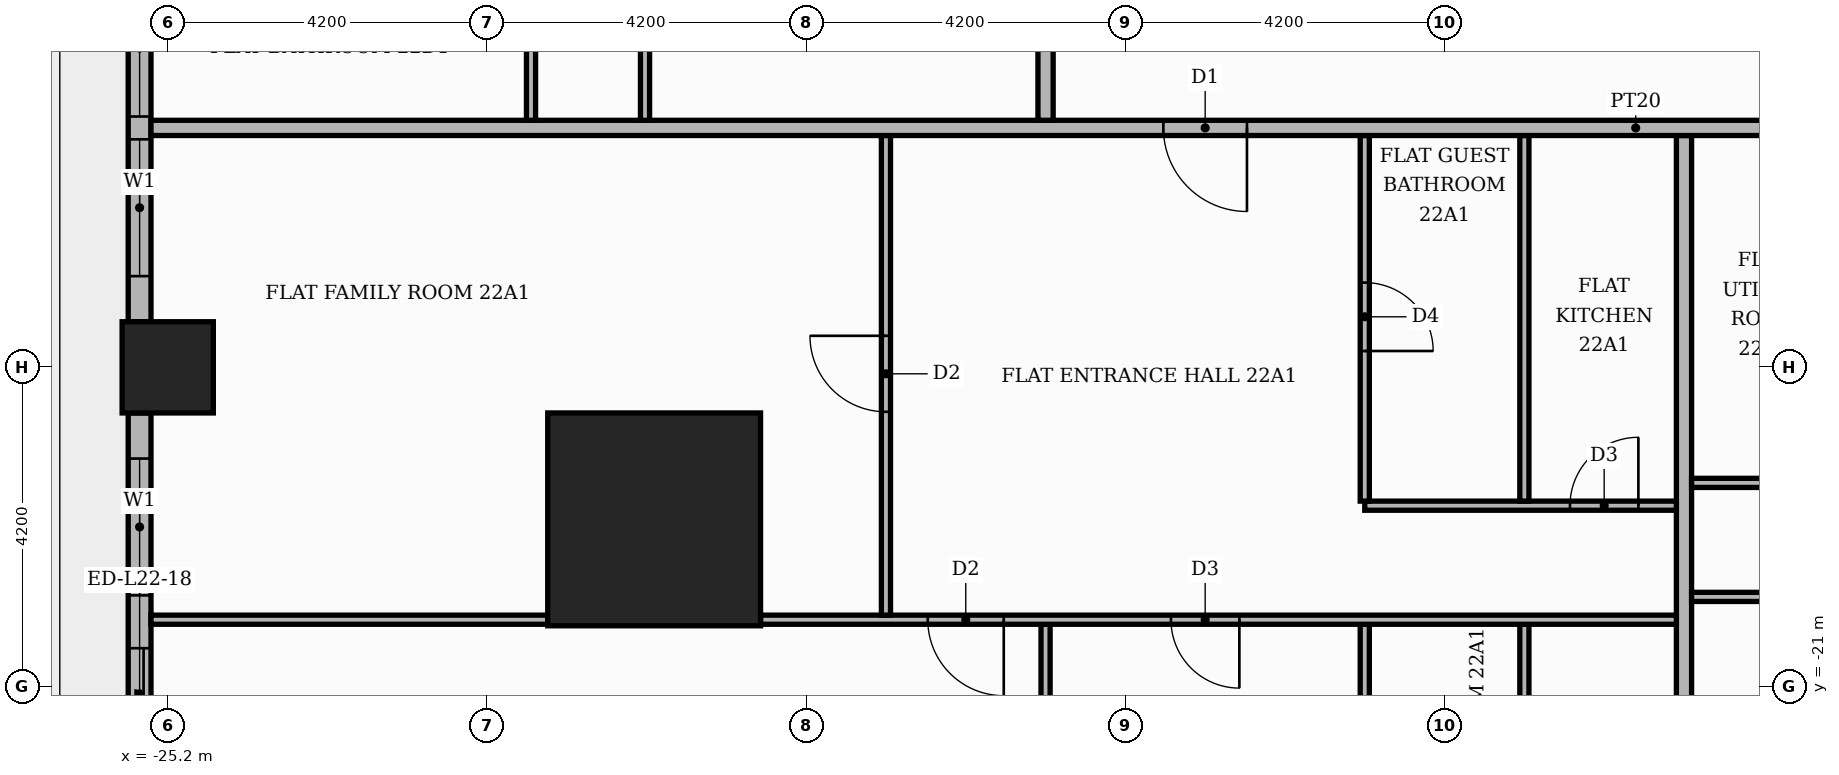
"""IFC4 building model, lengths in metres.
Left out: names, types, materials, properties, quantities, classifications, styles, units other than length and angle.
Written with IfcOpenShell. Run it as: python <this file> out.ifc"""

import sys

from ifc_helpers import new_model, si_unit, direction, frame, frame_2d, origin, origin_2d, place, context, subcontext, project, spatial, rectangle, extrude, element, fill, save


model = new_model("IFC4")
c1 = context("Model", 3, precision=1e-05, world=origin(), true_north=direction((0.0, 1.0)))
c2 = subcontext(c1, "Body", "Model", "MODEL_VIEW")
j1 = project(units=[si_unit("LENGTHUNIT", "METRE"), si_unit("PLANEANGLEUNIT", "RADIAN")], contexts=[c1])
p1 = place(None, origin())
s1 = spatial("IfcSite", under=j1, at=p1, CompositionType="ELEMENT")
p2 = place(p1, origin())
s2 = spatial("IfcBuilding", under=s1, at=p2, CompositionType="ELEMENT")
p3 = place(p2, frame((0.0, 0.0, 94.8)))
s3 = spatial("IfcBuildingStorey", under=s2, at=p3, CompositionType="ELEMENT", Elevation=94.8)
p4 = place(p3, frame((-18.8, -18.8, 0.0), z_axis=(0.0, 0.0, 1.0), x_axis=(1.0, 0.0, 0.0)))
e1 = element("IfcColumn", 1, at=p4, inside=s3, PredefinedType="COLUMN", context=c2, shape_type="SweptSolid", body=[
    extrude(rectangle(XDim=2.8, YDim=2.8, at=origin_2d()), origin(), (0.0, 0.0, 1.0), 3.9),
])
p5 = place(p3, frame((-25.2, -16.8, 0.0), z_axis=(0.0, 0.0, 1.0), x_axis=(1.0, 0.0, 0.0)))
e2 = element("IfcColumn", 2, at=p5, inside=s3, PredefinedType="COLUMN", context=c2, shape_type="SweptSolid", body=[
    extrude(rectangle(XDim=1.2, YDim=1.2, at=origin_2d()), origin(), (0.0, 0.0, 1.0), 3.9),
])
p6 = place(p3, frame((-25.57, -9.0, 0.0), z_axis=(0.0, 0.0, 1.0), x_axis=(0.0, -1.0, 0.0)))
e3 = element("IfcWall", 3, at=p6, inside=s3, PredefinedType="STANDARD", context=c2, shape_type="SweptSolid", body=[
    extrude(rectangle(XDim=7.2, YDim=0.3, at=frame_2d((3.6, 0.0))), origin(), (0.0, 0.0, 1.0), 3.48),
])
p7 = place(p6, frame((0.6, 0.0, 0.9)))
e4 = element("IfcOpeningElement", 4, at=p7, cuts=e3, PredefinedType="OPENING", context=c2, shape_type="SweptSolid", body=[
    extrude(rectangle(XDim=1.8, YDim=2.1, at=frame_2d((0.9, 1.05))), frame((0.0, 0.16, 0.0), z_axis=(0.0, -1.0, 0.0), x_axis=(1.0, 0.0, 0.0)), (0.0, 0.0, 1.0), 0.32),
])
p8 = place(p6, frame((2.7, 0.0, 0.9)))
e5 = element("IfcOpeningElement", 5, at=p8, cuts=e3, PredefinedType="OPENING", context=c2, shape_type="SweptSolid", body=[
    extrude(rectangle(XDim=1.8, YDim=2.1, at=frame_2d((0.9, 1.05))), frame((0.0, 0.16, 0.0), z_axis=(0.0, -1.0, 0.0), x_axis=(1.0, 0.0, 0.0)), (0.0, 0.0, 1.0), 0.32),
])
p9 = place(p6, frame((4.8, 0.0, 0.9)))
e6 = element("IfcOpeningElement", 6, at=p9, cuts=e3, PredefinedType="OPENING", context=c2, shape_type="SweptSolid", body=[
    extrude(rectangle(XDim=1.8, YDim=2.1, at=frame_2d((0.9, 1.05))), frame((0.0, 0.16, 0.0), z_axis=(0.0, -1.0, 0.0), x_axis=(1.0, 0.0, 0.0)), (0.0, 0.0, 1.0), 0.32),
])
p10 = place(p3, frame((-25.57, -17.4, 0.0), z_axis=(0.0, 0.0, 1.0), x_axis=(0.0, -1.0, 0.0)))
e7 = element("IfcWall", 7, at=p10, inside=s3, PredefinedType="STANDARD", context=c2, shape_type="SweptSolid", body=[
    extrude(rectangle(XDim=4.82, YDim=0.3, at=frame_2d((2.41, 0.0))), origin(), (0.0, 0.0, 1.0), 3.48),
])
p11 = place(p10, frame((0.6, 0.0, 0.9)))
e8 = element("IfcOpeningElement", 8, at=p11, cuts=e7, PredefinedType="OPENING", context=c2, shape_type="SweptSolid", body=[
    extrude(rectangle(XDim=1.8, YDim=2.1, at=frame_2d((0.9, 1.05))), frame((0.0, 0.16, 0.0), z_axis=(0.0, -1.0, 0.0), x_axis=(1.0, 0.0, 0.0)), (0.0, 0.0, 1.0), 0.32),
])
p12 = place(p10, frame((3.095, 0.0, 0.0)))
e9 = element("IfcOpeningElement", 9, at=p12, cuts=e7, PredefinedType="OPENING", context=c2, shape_type="SweptSolid", body=[
    extrude(rectangle(XDim=1.2, YDim=2.4, at=frame_2d((0.6, 1.2))), frame((0.0, 0.16, 0.0), z_axis=(0.0, -1.0, 0.0), x_axis=(1.0, 0.0, 0.0)), (0.0, 0.0, 1.0), 0.32),
])
p13 = place(p3, frame((-13.65, -25.42, 0.0), z_axis=(0.0, 0.0, 1.0), x_axis=(0.0, 1.0, 0.0)))
e10 = element("IfcWall", 10, at=p13, inside=s3, PredefinedType="PARTITIONING", context=c2, shape_type="SweptSolid", body=[
    extrude(rectangle(XDim=5.24, YDim=0.12, at=frame_2d((2.62, 0.0))), origin(), (0.0, 0.0, 1.0), 3.48),
])
p14 = place(p3, frame((-9.45, -25.42, 0.0), z_axis=(0.0, 0.0, 1.0), x_axis=(0.0, 1.0, 0.0)))
e11 = element("IfcWall", 11, at=p14, inside=s3, PredefinedType="PARTITIONING", context=c2, shape_type="SweptSolid", body=[
    extrude(rectangle(XDim=5.24, YDim=0.12, at=frame_2d((2.62, 0.0))), origin(), (0.0, 0.0, 1.0), 3.48),
])
p15 = place(p14, frame((2.05, 0.0, 0.0)))
e12 = element("IfcOpeningElement", 12, at=p15, cuts=e11, PredefinedType="OPENING", context=c2, shape_type="SweptSolid", body=[
    extrude(rectangle(XDim=0.9, YDim=2.1, at=frame_2d((0.45, 1.05))), frame((0.0, 0.07, 0.0), z_axis=(0.0, -1.0, 0.0), x_axis=(1.0, 0.0, 0.0)), (0.0, 0.0, 1.0), 0.14),
])
p16 = place(p3, frame((-7.35, -25.42, 0.0), z_axis=(0.0, 0.0, 1.0), x_axis=(0.0, 1.0, 0.0)))
e13 = element("IfcWall", 13, at=p16, inside=s3, PredefinedType="PARTITIONING", context=c2, shape_type="SweptSolid", body=[
    extrude(rectangle(XDim=5.24, YDim=0.12, at=frame_2d((2.62, 0.0))), origin(), (0.0, 0.0, 1.0), 3.48),
])
p17 = place(p16, frame((2.05, 0.0, 0.0)))
e14 = element("IfcOpeningElement", 14, at=p17, cuts=e13, PredefinedType="OPENING", context=c2, shape_type="SweptSolid", body=[
    extrude(rectangle(XDim=0.9, YDim=2.1, at=frame_2d((0.45, 1.05))), frame((0.0, 0.07, 0.0), z_axis=(0.0, -1.0, 0.0), x_axis=(1.0, 0.0, 0.0)), (0.0, 0.0, 1.0), 0.14),
])
p18 = place(p3, frame((-5.25, -25.42, 0.0), z_axis=(0.0, 0.0, 1.0), x_axis=(0.0, 1.0, 0.0)))
e15 = element("IfcWall", 15, at=p18, inside=s3, PredefinedType="PARTITIONING", context=c2, shape_type="SweptSolid", body=[
    extrude(rectangle(XDim=11.67, YDim=0.2, at=frame_2d((5.835, 0.0))), origin(), (0.0, 0.0, 1.0), 3.48),
])
p19 = place(p3, frame((-25.42, -20.12, 0.0), z_axis=(0.0, 0.0, 1.0), x_axis=(1.0, 0.0, 0.0)))
e16 = element("IfcWall", 16, at=p19, inside=s3, PredefinedType="PARTITIONING", context=c2, shape_type="SweptSolid", body=[
    extrude(rectangle(XDim=5.22, YDim=0.12, at=frame_2d((2.61, 0.0))), origin(), (0.0, 0.0, 1.0), 3.48),
])
p20 = place(p3, frame((-17.4, -20.12, 0.0), z_axis=(0.0, 0.0, 1.0), x_axis=(1.0, 0.0, 0.0)))
e17 = element("IfcWall", 17, at=p20, inside=s3, PredefinedType="PARTITIONING", context=c2, shape_type="SweptSolid", body=[
    extrude(rectangle(XDim=12.05, YDim=0.12, at=frame_2d((6.025, 0.0))), origin(), (0.0, 0.0, 1.0), 3.48),
])
p21 = place(p20, frame((2.2, 0.0, 0.0)))
e18 = element("IfcOpeningElement", 18, at=p21, cuts=e17, PredefinedType="OPENING", context=c2, shape_type="SweptSolid", body=[
    extrude(rectangle(XDim=1.0, YDim=2.1, at=frame_2d((0.5, 1.05))), frame((0.0, 0.07, 0.0), z_axis=(0.0, -1.0, 0.0), x_axis=(1.0, 0.0, 0.0)), (0.0, 0.0, 1.0), 0.14),
])
p22 = place(p20, frame((5.4, 0.0, 0.0)))
e19 = element("IfcOpeningElement", 19, at=p22, cuts=e17, PredefinedType="OPENING", context=c2, shape_type="SweptSolid", body=[
    extrude(rectangle(XDim=0.9, YDim=2.1, at=frame_2d((0.45, 1.05))), frame((0.0, 0.07, 0.0), z_axis=(0.0, -1.0, 0.0), x_axis=(1.0, 0.0, 0.0)), (0.0, 0.0, 1.0), 0.14),
])
p23 = place(p3, frame((-15.75, -20.06, 0.0), z_axis=(0.0, 0.0, 1.0), x_axis=(0.0, 1.0, 0.0)))
e20 = element("IfcWall", 20, at=p23, inside=s3, PredefinedType="PARTITIONING", context=c2, shape_type="SweptSolid", body=[
    extrude(rectangle(XDim=6.31, YDim=0.12, at=frame_2d((3.155, 0.0))), origin(), (0.0, 0.0, 1.0), 3.48),
])
p24 = place(p23, frame((2.675, 0.0, 0.0)))
e21 = element("IfcOpeningElement", 21, at=p24, cuts=e20, PredefinedType="OPENING", context=c2, shape_type="SweptSolid", body=[
    extrude(rectangle(XDim=1.0, YDim=2.1, at=frame_2d((0.5, 1.05))), frame((0.0, 0.07, 0.0), z_axis=(0.0, -1.0, 0.0), x_axis=(1.0, 0.0, 0.0)), (0.0, 0.0, 1.0), 0.14),
])
p25 = place(p3, frame((-5.15, -19.82, 0.0), z_axis=(0.0, 0.0, 1.0), x_axis=(1.0, 0.0, 0.0)))
e22 = element("IfcWall", 22, at=p25, inside=s3, PredefinedType="PARTITIONING", context=c2, shape_type="SweptSolid", body=[
    extrude(rectangle(XDim=18.7, YDim=0.12, at=frame_2d((9.35, 0.0))), origin(), (0.0, 0.0, 1.0), 3.48),
])
p26 = place(p25, frame((1.5, 0.0, 0.0)))
e23 = element("IfcOpeningElement", 23, at=p26, cuts=e22, PredefinedType="OPENING", context=c2, shape_type="SweptSolid", body=[
    extrude(rectangle(XDim=1.0, YDim=2.1, at=frame_2d((0.5, 1.05))), frame((0.0, 0.07, 0.0), z_axis=(0.0, -1.0, 0.0), x_axis=(1.0, 0.0, 0.0)), (0.0, 0.0, 1.0), 0.14),
])
p27 = place(p25, frame((5.75, 0.0, 0.0)))
e24 = element("IfcOpeningElement", 24, at=p27, cuts=e22, PredefinedType="OPENING", context=c2, shape_type="SweptSolid", body=[
    extrude(rectangle(XDim=0.9, YDim=2.1, at=frame_2d((0.45, 1.05))), frame((0.0, 0.07, 0.0), z_axis=(0.0, -1.0, 0.0), x_axis=(1.0, 0.0, 0.0)), (0.0, 0.0, 1.0), 0.14),
])
p28 = place(p25, frame((14.15, 0.0, 0.0)))
e25 = element("IfcOpeningElement", 25, at=p28, cuts=e22, PredefinedType="OPENING", context=c2, shape_type="SweptSolid", body=[
    extrude(rectangle(XDim=0.9, YDim=2.1, at=frame_2d((0.45, 1.05))), frame((0.0, 0.07, 0.0), z_axis=(0.0, -1.0, 0.0), x_axis=(1.0, 0.0, 0.0)), (0.0, 0.0, 1.0), 0.14),
])
p29 = place(p3, frame((-9.45, -18.62, 0.0), z_axis=(0.0, 0.0, 1.0), x_axis=(1.0, 0.0, 0.0)))
e26 = element("IfcWall", 26, at=p29, inside=s3, PredefinedType="PARTITIONING", context=c2, shape_type="SweptSolid", body=[
    extrude(rectangle(XDim=4.1, YDim=0.12, at=frame_2d((2.05, 0.0))), origin(), (0.0, 0.0, 1.0), 3.48),
])
p30 = place(p29, frame((2.7, 0.0, 0.0)))
e27 = element("IfcOpeningElement", 27, at=p30, cuts=e26, PredefinedType="OPENING", context=c2, shape_type="SweptSolid", body=[
    extrude(rectangle(XDim=0.9, YDim=2.1, at=frame_2d((0.45, 1.05))), frame((0.0, 0.07, 0.0), z_axis=(0.0, -1.0, 0.0), x_axis=(1.0, 0.0, 0.0)), (0.0, 0.0, 1.0), 0.14),
])
p31 = place(p3, frame((-9.45, -18.56, 0.0), z_axis=(0.0, 0.0, 1.0), x_axis=(0.0, 1.0, 0.0)))
e28 = element("IfcWall", 28, at=p31, inside=s3, PredefinedType="PARTITIONING", context=c2, shape_type="SweptSolid", body=[
    extrude(rectangle(XDim=4.81, YDim=0.12, at=frame_2d((2.405, 0.0))), origin(), (0.0, 0.0, 1.0), 3.48),
])
p32 = place(p31, frame((1.975, 0.0, 0.0)))
e29 = element("IfcOpeningElement", 29, at=p32, cuts=e28, PredefinedType="OPENING", context=c2, shape_type="SweptSolid", body=[
    extrude(rectangle(XDim=0.9, YDim=2.1, at=frame_2d((0.45, 1.05))), frame((0.0, 0.07, 0.0), z_axis=(0.0, -1.0, 0.0), x_axis=(1.0, 0.0, 0.0)), (0.0, 0.0, 1.0), 0.14),
])
p33 = place(p3, frame((-7.35, -18.56, 0.0), z_axis=(0.0, 0.0, 1.0), x_axis=(0.0, 1.0, 0.0)))
e30 = element("IfcWall", 30, at=p33, inside=s3, PredefinedType="PARTITIONING", context=c2, shape_type="SweptSolid", body=[
    extrude(rectangle(XDim=4.81, YDim=0.12, at=frame_2d((2.405, 0.0))), origin(), (0.0, 0.0, 1.0), 3.48),
])
p34 = place(p3, frame((-5.15, -18.32, 0.0), z_axis=(0.0, 0.0, 1.0), x_axis=(1.0, 0.0, 0.0)))
e31 = element("IfcWall", 31, at=p34, inside=s3, PredefinedType="PARTITIONING", context=c2, shape_type="SweptSolid", body=[
    extrude(rectangle(XDim=2.0, YDim=0.12, at=frame_2d((1.0, 0.0))), origin(), (0.0, 0.0, 1.0), 3.48),
])
p35 = place(p3, frame((-25.42, -13.65, 0.0), z_axis=(0.0, 0.0, 1.0), x_axis=(1.0, 0.0, 0.0)))
e32 = element("IfcWall", 32, at=p35, inside=s3, PredefinedType="PARTITIONING", context=c2, shape_type="SweptSolid", body=[
    extrude(rectangle(XDim=39.07, YDim=0.2, at=frame_2d((19.535, 0.0))), origin(), (0.0, 0.0, 1.0), 3.48),
])
p36 = place(p35, frame((13.32, 0.0, 0.0)))
e33 = element("IfcOpeningElement", 33, at=p36, cuts=e32, PredefinedType="OPENING", context=c2, shape_type="SweptSolid", body=[
    extrude(rectangle(XDim=1.1, YDim=2.4, at=frame_2d((0.55, 1.2))), frame((0.0, 0.11, 0.0), z_axis=(0.0, -1.0, 0.0), x_axis=(1.0, 0.0, 0.0)), (0.0, 0.0, 1.0), 0.22),
])
p37 = place(p35, frame((23.82, 0.0, 0.0)))
e34 = element("IfcOpeningElement", 34, at=p37, cuts=e32, PredefinedType="OPENING", context=c2, shape_type="SweptSolid", body=[
    extrude(rectangle(XDim=1.1, YDim=2.4, at=frame_2d((0.55, 1.2))), frame((0.0, 0.11, 0.0), z_axis=(0.0, -1.0, 0.0), x_axis=(1.0, 0.0, 0.0)), (0.0, 0.0, 1.0), 0.22),
])
p38 = place(p3, frame((-20.42, -13.55, 0.0), z_axis=(0.0, 0.0, 1.0), x_axis=(0.0, 1.0, 0.0)))
e35 = element("IfcWall", 35, at=p38, inside=s3, PredefinedType="PARTITIONING", context=c2, shape_type="SweptSolid", body=[
    extrude(rectangle(XDim=1.94, YDim=0.12, at=frame_2d((0.97, 0.0))), origin(), (0.0, 0.0, 1.0), 3.48),
])
p39 = place(p3, frame((-18.92, -13.55, 0.0), z_axis=(0.0, 0.0, 1.0), x_axis=(0.0, 1.0, 0.0)))
e36 = element("IfcWall", 36, at=p39, inside=s3, PredefinedType="PARTITIONING", context=c2, shape_type="SweptSolid", body=[
    extrude(rectangle(XDim=4.19, YDim=0.12, at=frame_2d((2.095, 0.0))), origin(), (0.0, 0.0, 1.0), 3.48),
])
p40 = place(p39, frame((1.625, 0.0, 0.0)))
e37 = element("IfcOpeningElement", 37, at=p40, cuts=e36, PredefinedType="OPENING", context=c2, shape_type="SweptSolid", body=[
    extrude(rectangle(XDim=0.9, YDim=2.1, at=frame_2d((0.45, 1.05))), frame((0.0, 0.07, 0.0), z_axis=(0.0, -1.0, 0.0), x_axis=(1.0, 0.0, 0.0)), (0.0, 0.0, 1.0), 0.14),
])
p41 = place(p3, frame((-13.65, -13.55, 0.0), z_axis=(0.0, 0.0, 1.0), x_axis=(0.0, 1.0, 0.0)))
e38 = element("IfcWall", 38, at=p41, inside=s3, PredefinedType="PARTITIONING", context=c2, shape_type="SweptSolid", body=[
    extrude(rectangle(XDim=27.1, YDim=0.2, at=frame_2d((13.55, 0.0))), origin(), (0.0, 0.0, 1.0), 3.48),
])
p42 = place(p41, frame((24.55, 0.0, 0.0)))
e39 = element("IfcOpeningElement", 39, at=p42, cuts=e38, PredefinedType="OPENING", context=c2, shape_type="SweptSolid", body=[
    extrude(rectangle(XDim=1.1, YDim=2.4, at=frame_2d((0.55, 1.2))), frame((0.0, 0.11, 0.0), z_axis=(0.0, -1.0, 0.0), x_axis=(1.0, 0.0, 0.0)), (0.0, 0.0, 1.0), 0.22),
])
p43 = place(p8, origin())
e40 = element("IfcWindow", 40, at=p43, inside=s3, PartitioningType="SINGLE_PANEL", PredefinedType="WINDOW", context=c2, shape_type="SweptSolid", body=[
    extrude(rectangle(XDim=1.8, YDim=2.1, at=frame_2d((0.9, 1.05))), frame((0.0, 0.03, 0.0), z_axis=(0.0, -1.0, 0.0), x_axis=(1.0, 0.0, 0.0)), (0.0, 0.0, 1.0), 0.06),
])
fill(e5, e40)
p44 = place(p9, origin())
e41 = element("IfcWindow", 41, at=p44, inside=s3, PartitioningType="SINGLE_PANEL", PredefinedType="WINDOW", context=c2, shape_type="SweptSolid", body=[
    extrude(rectangle(XDim=1.8, YDim=2.1, at=frame_2d((0.9, 1.05))), frame((0.0, 0.03, 0.0), z_axis=(0.0, -1.0, 0.0), x_axis=(1.0, 0.0, 0.0)), (0.0, 0.0, 1.0), 0.06),
])
fill(e6, e41)
p45 = place(p11, origin())
e42 = element("IfcWindow", 42, at=p45, inside=s3, PartitioningType="SINGLE_PANEL", PredefinedType="WINDOW", context=c2, shape_type="SweptSolid", body=[
    extrude(rectangle(XDim=1.8, YDim=2.1, at=frame_2d((0.9, 1.05))), frame((0.0, 0.03, 0.0), z_axis=(0.0, -1.0, 0.0), x_axis=(1.0, 0.0, 0.0)), (0.0, 0.0, 1.0), 0.06),
])
fill(e8, e42)
p46 = place(p12, origin())
e43 = element("IfcDoor", 43, at=p46, inside=s3, OperationType="SLIDING_TO_RIGHT", PredefinedType="DOOR", context=c2, shape_type="SweptSolid", body=[
    extrude(rectangle(XDim=1.2, YDim=2.4, at=frame_2d((0.6, 1.2))), frame((0.0, 0.025, 0.0), z_axis=(0.0, -1.0, 0.0), x_axis=(1.0, 0.0, 0.0)), (0.0, 0.0, 1.0), 0.05),
])
fill(e9, e43)
p47 = place(p36, frame((1.1, 0.0, 0.0), z_axis=(0.0, 0.0, 1.0), x_axis=(-1.0, 0.0, 0.0)))
e44 = element("IfcDoor", 44, at=p47, inside=s3, OperationType="SINGLE_SWING_RIGHT", PredefinedType="DOOR", context=c2, shape_type="SweptSolid", body=[
    extrude(rectangle(XDim=1.1, YDim=2.4, at=frame_2d((0.55, 1.2))), frame((0.0, 0.025, 0.0), z_axis=(0.0, -1.0, 0.0), x_axis=(1.0, 0.0, 0.0)), (0.0, 0.0, 1.0), 0.05),
])
fill(e33, e44)
p48 = place(p24, origin())
e45 = element("IfcDoor", 45, at=p48, inside=s3, OperationType="SINGLE_SWING_RIGHT", PredefinedType="DOOR", context=c2, shape_type="SweptSolid", body=[
    extrude(rectangle(XDim=1.0, YDim=2.1, at=frame_2d((0.5, 1.05))), frame((0.0, 0.025, 0.0), z_axis=(0.0, -1.0, 0.0), x_axis=(1.0, 0.0, 0.0)), (0.0, 0.0, 1.0), 0.05),
])
fill(e21, e45)
p49 = place(p32, frame((0.9, 0.0, 0.0), z_axis=(0.0, 0.0, 1.0), x_axis=(-1.0, 0.0, 0.0)))
e46 = element("IfcDoor", 46, at=p49, inside=s3, OperationType="SINGLE_SWING_LEFT", PredefinedType="DOOR", context=c2, shape_type="SweptSolid", body=[
    extrude(rectangle(XDim=0.9, YDim=2.1, at=frame_2d((0.45, 1.05))), frame((0.0, 0.025, 0.0), z_axis=(0.0, -1.0, 0.0), x_axis=(1.0, 0.0, 0.0)), (0.0, 0.0, 1.0), 0.05),
])
fill(e29, e46)
p50 = place(p30, origin())
e47 = element("IfcDoor", 47, at=p50, inside=s3, OperationType="SINGLE_SWING_RIGHT", PredefinedType="DOOR", context=c2, shape_type="SweptSolid", body=[
    extrude(rectangle(XDim=0.9, YDim=2.1, at=frame_2d((0.45, 1.05))), frame((0.0, 0.025, 0.0), z_axis=(0.0, -1.0, 0.0), x_axis=(1.0, 0.0, 0.0)), (0.0, 0.0, 1.0), 0.05),
])
fill(e27, e47)
p51 = place(p21, frame((1.0, 0.0, 0.0), z_axis=(0.0, 0.0, 1.0), x_axis=(-1.0, 0.0, 0.0)))
e48 = element("IfcDoor", 48, at=p51, inside=s3, OperationType="SINGLE_SWING_RIGHT", PredefinedType="DOOR", context=c2, shape_type="SweptSolid", body=[
    extrude(rectangle(XDim=1.0, YDim=2.1, at=frame_2d((0.5, 1.05))), frame((0.0, 0.025, 0.0), z_axis=(0.0, -1.0, 0.0), x_axis=(1.0, 0.0, 0.0)), (0.0, 0.0, 1.0), 0.05),
])
fill(e18, e48)
p52 = place(p22, frame((0.9, 0.0, 0.0), z_axis=(0.0, 0.0, 1.0), x_axis=(-1.0, 0.0, 0.0)))
e49 = element("IfcDoor", 49, at=p52, inside=s3, OperationType="SINGLE_SWING_RIGHT", PredefinedType="DOOR", context=c2, shape_type="SweptSolid", body=[
    extrude(rectangle(XDim=0.9, YDim=2.1, at=frame_2d((0.45, 1.05))), frame((0.0, 0.025, 0.0), z_axis=(0.0, -1.0, 0.0), x_axis=(1.0, 0.0, 0.0)), (0.0, 0.0, 1.0), 0.05),
])
fill(e19, e49)
save(model, sys.argv[1])
